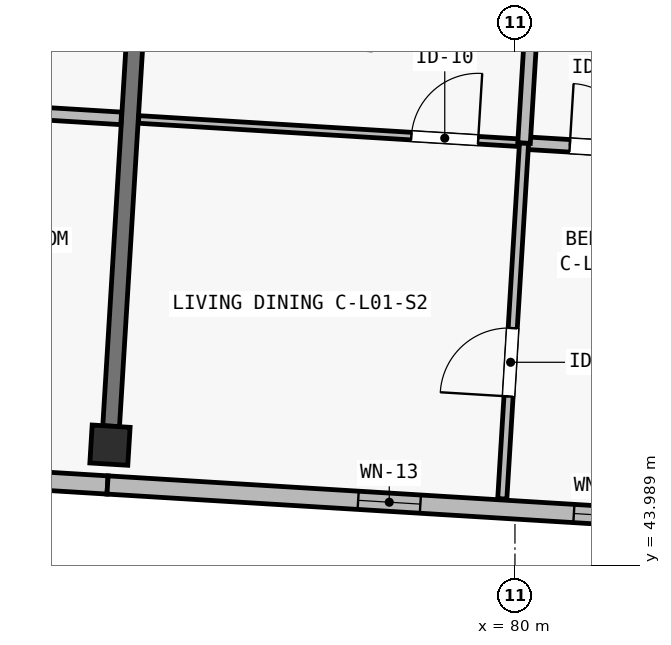
"""IFC4 building model, lengths in metres.
Left out: names, types, materials, properties, quantities, classifications, styles, units other than length and angle.
Written with IfcOpenShell. Run it as: python <this file> out.ifc"""

import sys

from ifc_helpers import new_model, si_unit, direction, frame, frame_2d, origin, origin_2d, place, context, subcontext, project, spatial, rectangle, extrude, element, fill, save


model = new_model("IFC4")
c1 = context("Model", 3, precision=1e-05, world=origin(), true_north=direction((0.0, 1.0)))
c2 = subcontext(c1, "Body", "Model", "MODEL_VIEW")
j1 = project(units=[si_unit("LENGTHUNIT", "METRE"), si_unit("PLANEANGLEUNIT", "RADIAN")], contexts=[c1])
p1 = place(None, origin())
s1 = spatial("IfcSite", under=j1, at=p1, CompositionType="ELEMENT")
p2 = place(p1, origin())
s2 = spatial("IfcBuilding", under=s1, at=p2, CompositionType="ELEMENT")
p3 = place(p2, frame((0.0, 0.0, 4.5)))
s3 = spatial("IfcBuildingStorey", under=s2, at=p3, CompositionType="ELEMENT", Elevation=4.5)
p4 = place(p3, frame((74.672, 45.572, 0.0), z_axis=(0.0, 0.0, 1.0), x_axis=(0.998134798422, -0.061048539535, 0.0)))
e1 = element("IfcColumn", 1, at=p4, inside=s3, PredefinedType="COLUMN", context=c2, shape_type="SweptSolid", body=[
    extrude(rectangle(XDim=0.5, YDim=0.5, at=origin_2d()), origin(), (0.0, 0.0, 1.0), 3.9),
])
p5 = place(p3, frame((74.687, 45.822, -0.25), z_axis=(0.0, 0.0, 1.0), x_axis=(0.061033859059, 0.99813569621, 0.0)))
e2 = element("IfcWall", 2, at=p5, inside=s3, PredefinedType="SHEAR", context=c2, shape_type="SweptSolid", body=[
    extrude(rectangle(XDim=7.1, YDim=0.22, at=frame_2d((3.55, 0.0))), origin(), (0.0, 0.0, 1.0), 3.4),
])
p6 = place(p3, frame((74.64, 45.048, 0.0), z_axis=(0.0, 0.0, 1.0), x_axis=(-0.998135669243, 0.061034300063, 0.0)))
e3 = element("IfcWall", 3, at=p6, inside=s3, PredefinedType="SOLIDWALL", context=c2, shape_type="SweptSolid", body=[
    extrude(rectangle(XDim=7.6, YDim=0.24, at=frame_2d((3.8, 0.0))), origin(), (0.0, 0.0, 1.0), 3.65),
])
p7 = place(p6, frame((5.019, 0.0, 0.0)))
e4 = element("IfcOpeningElement", 4, at=p7, cuts=e3, PredefinedType="OPENING", context=c2, shape_type="SweptSolid", body=[
    extrude(rectangle(XDim=1.8, YDim=2.12, at=frame_2d((0.9, 1.06))), frame((0.0, 0.135, 0.0), z_axis=(0.0, -1.0, 0.0), x_axis=(1.0, 0.0, 0.0)), (0.0, 0.0, 1.0), 0.27),
])
p8 = place(p6, frame((0.93, 0.0, 0.5)))
e5 = element("IfcOpeningElement", 5, at=p8, cuts=e3, PredefinedType="OPENING", context=c2, shape_type="SweptSolid", body=[
    extrude(rectangle(XDim=0.58, YDim=2.16, at=frame_2d((0.29, 1.08))), frame((0.0, 0.135, 0.0), z_axis=(0.0, -1.0, 0.0), x_axis=(1.0, 0.0, 0.0)), (0.0, 0.0, 1.0), 0.27),
])
p9 = place(p3, frame((82.225, 44.584, 0.0), z_axis=(0.0, 0.0, 1.0), x_axis=(-0.998133591969, 0.061068261669, 0.0)))
e6 = element("IfcWall", 6, at=p9, inside=s3, PredefinedType="SOLIDWALL", context=c2, shape_type="SweptSolid", body=[
    extrude(rectangle(XDim=7.6, YDim=0.24, at=frame_2d((3.8, 0.0))), origin(), (0.0, 0.0, 1.0), 3.65),
])
p10 = place(p9, frame((0.693, 0.0, 0.42)))
e7 = element("IfcOpeningElement", 7, at=p10, cuts=e6, PredefinedType="OPENING", context=c2, shape_type="SweptSolid", body=[
    extrude(rectangle(XDim=0.76, YDim=2.34, at=frame_2d((0.38, 1.17))), frame((0.0, 0.135, 0.0), z_axis=(0.0, -1.0, 0.0), x_axis=(1.0, 0.0, 0.0)), (0.0, 0.0, 1.0), 0.27),
])
p11 = place(p9, frame((3.476, 0.0, 0.42)))
e8 = element("IfcOpeningElement", 8, at=p11, cuts=e6, PredefinedType="OPENING", context=c2, shape_type="SweptSolid", body=[
    extrude(rectangle(XDim=0.82, YDim=2.18, at=frame_2d((0.41, 1.09))), frame((0.0, 0.135, 0.0), z_axis=(0.0, -1.0, 0.0), x_axis=(1.0, 0.0, 0.0)), (0.0, 0.0, 1.0), 0.27),
])
p12 = place(p3, frame((71.141, 50.096, 0.0), z_axis=(0.0, 0.0, 1.0), x_axis=(0.998136472989, -0.061021154439, 0.0)))
e9 = element("IfcWall", 9, at=p12, inside=s3, PredefinedType="PLUMBINGWALL", context=c2, shape_type="SweptSolid", body=[
    extrude(rectangle(XDim=3.685, YDim=0.165, at=frame_2d((1.842, 0.0))), origin(), (0.0, 0.0, 1.0), 3.62),
])
p13 = place(p12, frame((1.3, 0.0, 0.0)))
e10 = element("IfcOpeningElement", 10, at=p13, cuts=e9, PredefinedType="OPENING", context=c2, shape_type="SweptSolid", body=[
    extrude(rectangle(XDim=0.82, YDim=2.08, at=frame_2d((0.41, 1.04))), frame((0.0, 0.097, 0.0), z_axis=(0.0, -1.0, 0.0), x_axis=(1.0, 0.0, 0.0)), (0.0, 0.0, 1.0), 0.195),
])
p14 = place(p3, frame((75.049, 49.857, 0.0), z_axis=(0.0, 0.0, 1.0), x_axis=(0.998135637207, -0.061034823981, 0.0)))
e11 = element("IfcWall", 11, at=p14, inside=s3, PredefinedType="PARTITIONING", context=c2, shape_type="SweptSolid", body=[
    extrude(rectangle(XDim=5.08, YDim=0.1, at=frame_2d((2.54, 0.0))), origin(), (0.0, 0.0, 1.0), 3.62),
])
p15 = place(p14, frame((3.595, 0.0, 0.0)))
e12 = element("IfcOpeningElement", 12, at=p15, cuts=e11, PredefinedType="OPENING", context=c2, shape_type="SweptSolid", body=[
    extrude(rectangle(XDim=0.88, YDim=2.1, at=frame_2d((0.44, 1.05))), frame((0.0, 0.065, 0.0), z_axis=(0.0, -1.0, 0.0), x_axis=(1.0, 0.0, 0.0)), (0.0, 0.0, 1.0), 0.13),
])
p16 = place(p3, frame((80.119, 49.547, 0.0), z_axis=(0.0, 0.0, 1.0), x_axis=(0.99813262565, -0.061084053668, 0.0)))
e13 = element("IfcWall", 13, at=p16, inside=s3, PredefinedType="PLUMBINGWALL", context=c2, shape_type="SweptSolid", body=[
    extrude(rectangle(XDim=2.29, YDim=0.165, at=frame_2d((1.145, 0.0))), origin(), (0.0, 0.0, 1.0), 3.62),
])
p17 = place(p16, frame((0.603, 0.0, 0.0)))
e14 = element("IfcOpeningElement", 14, at=p17, cuts=e13, PredefinedType="OPENING", context=c2, shape_type="SweptSolid", body=[
    extrude(rectangle(XDim=0.82, YDim=2.08, at=frame_2d((0.41, 1.04))), frame((0.0, 0.097, 0.0), z_axis=(0.0, -1.0, 0.0), x_axis=(1.0, 0.0, 0.0)), (0.0, 0.0, 1.0), 0.195),
])
p18 = place(p3, frame((79.833, 44.866, 0.0), z_axis=(0.0, 0.0, 1.0), x_axis=(0.061010571843, 0.998137119901, 0.0)))
e15 = element("IfcWall", 15, at=p18, inside=s3, PredefinedType="PARTITIONING", context=c2, shape_type="SweptSolid", body=[
    extrude(rectangle(XDim=4.69, YDim=0.12, at=frame_2d((2.345, 0.0))), origin(), (0.0, 0.0, 1.0), 3.62),
])
p19 = place(p18, frame((1.35, 0.0, 0.0)))
e16 = element("IfcOpeningElement", 16, at=p19, cuts=e15, PredefinedType="OPENING", context=c2, shape_type="SweptSolid", body=[
    extrude(rectangle(XDim=0.9, YDim=2.1, at=frame_2d((0.45, 1.05))), frame((0.0, 0.075, 0.0), z_axis=(0.0, -1.0, 0.0), x_axis=(1.0, 0.0, 0.0)), (0.0, 0.0, 1.0), 0.15),
])
p20 = place(p3, frame((80.119, 49.547, 0.0), z_axis=(0.0, 0.0, 1.0), x_axis=(0.061099388563, 0.998131687062, 0.0)))
e17 = element("IfcWall", 17, at=p20, inside=s3, PredefinedType="PLUMBINGWALL", context=c2, shape_type="SweptSolid", body=[
    extrude(rectangle(XDim=3.72, YDim=0.165, at=frame_2d((1.86, 0.0))), origin(), (0.0, 0.0, 1.0), 3.62),
])
p21 = place(p10, origin())
e18 = element("IfcWindow", 18, at=p21, inside=s3, PartitioningType="SINGLE_PANEL", PredefinedType="WINDOW", context=c2, shape_type="SweptSolid", body=[
    extrude(rectangle(XDim=0.76, YDim=2.34, at=frame_2d((0.38, 1.17))), frame((0.0, 0.03, 0.0), z_axis=(0.0, -1.0, 0.0), x_axis=(1.0, 0.0, 0.0)), (0.0, 0.0, 1.0), 0.06),
])
fill(e7, e18)
p22 = place(p11, origin())
e19 = element("IfcWindow", 19, at=p22, inside=s3, PartitioningType="SINGLE_PANEL", PredefinedType="WINDOW", context=c2, shape_type="SweptSolid", body=[
    extrude(rectangle(XDim=0.82, YDim=2.18, at=frame_2d((0.41, 1.09))), frame((0.0, 0.03, 0.0), z_axis=(0.0, -1.0, 0.0), x_axis=(1.0, 0.0, 0.0)), (0.0, 0.0, 1.0), 0.06),
])
fill(e8, e19)
p23 = place(p15, origin())
e20 = element("IfcDoor", 20, at=p23, inside=s3, OperationType="SINGLE_SWING_RIGHT", PredefinedType="DOOR", context=c2, shape_type="SweptSolid", body=[
    extrude(rectangle(XDim=0.88, YDim=2.1, at=frame_2d((0.44, 1.05))), frame((0.0, 0.025, 0.0), z_axis=(0.0, -1.0, 0.0), x_axis=(1.0, 0.0, 0.0)), (0.0, 0.0, 1.0), 0.05),
])
fill(e12, e20)
p24 = place(p17, origin())
e21 = element("IfcDoor", 21, at=p24, inside=s3, OperationType="SINGLE_SWING_LEFT", PredefinedType="DOOR", context=c2, shape_type="SweptSolid", body=[
    extrude(rectangle(XDim=0.82, YDim=2.08, at=frame_2d((0.41, 1.04))), frame((0.0, 0.025, 0.0), z_axis=(0.0, -1.0, 0.0), x_axis=(1.0, 0.0, 0.0)), (0.0, 0.0, 1.0), 0.05),
])
fill(e14, e21)
p25 = place(p19, origin())
e22 = element("IfcDoor", 22, at=p25, inside=s3, OperationType="SINGLE_SWING_LEFT", PredefinedType="DOOR", context=c2, shape_type="SweptSolid", body=[
    extrude(rectangle(XDim=0.9, YDim=2.1, at=frame_2d((0.45, 1.05))), frame((0.0, 0.025, 0.0), z_axis=(0.0, -1.0, 0.0), x_axis=(1.0, 0.0, 0.0)), (0.0, 0.0, 1.0), 0.05),
])
fill(e16, e22)
save(model, sys.argv[1])
